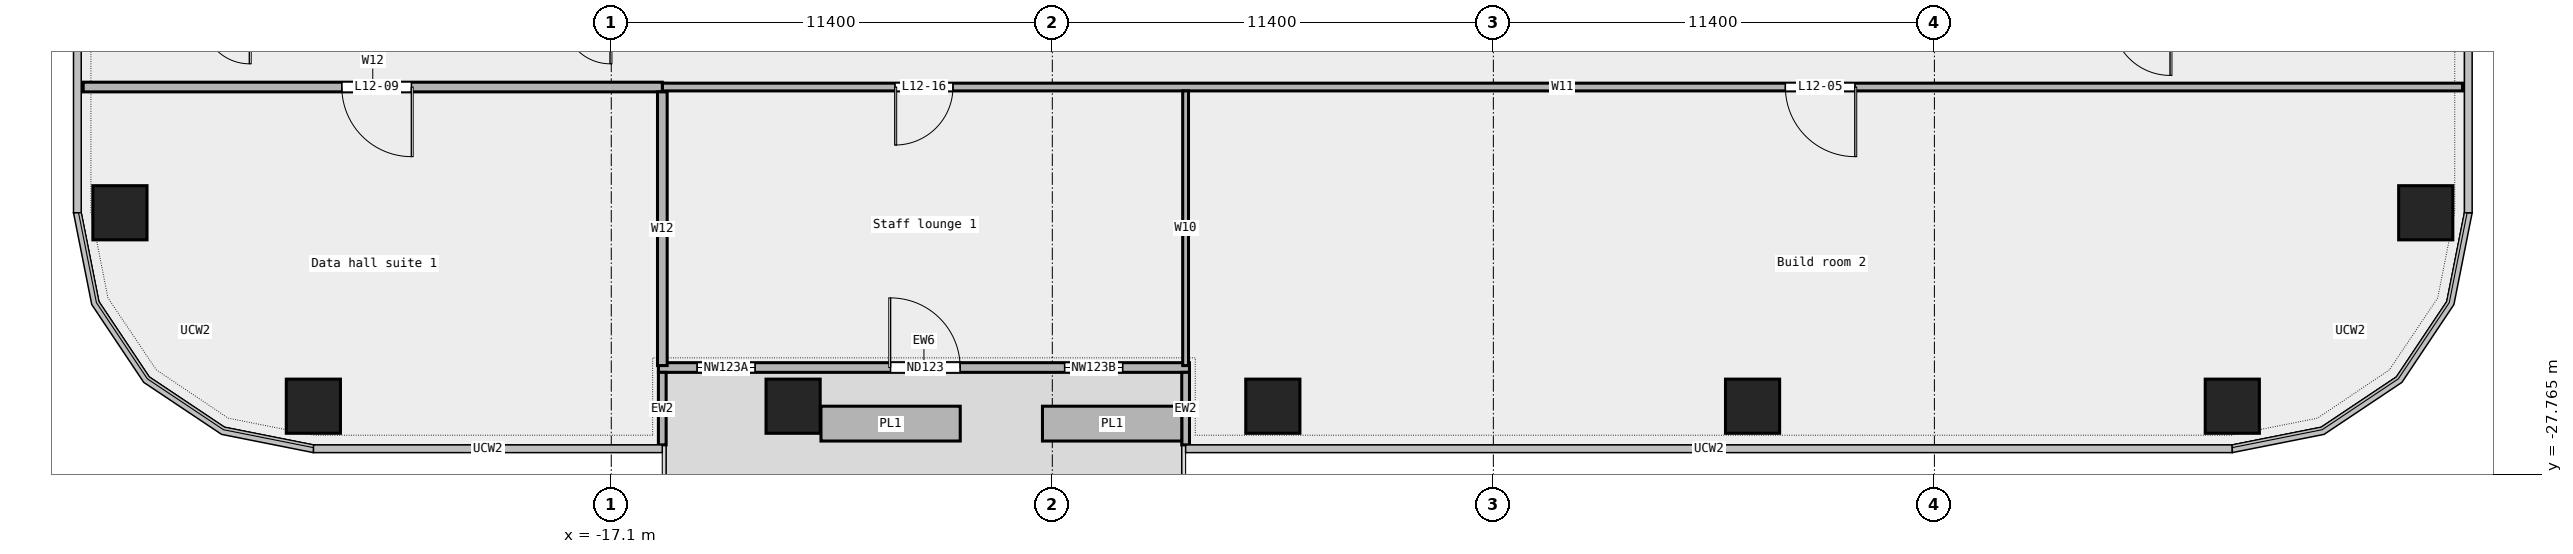
"""IFC4 building model, lengths in metres.
Left out: names, types, materials, properties, quantities, classifications, styles, units other than length and angle.
Written with IfcOpenShell. Run it as: python <this file> out.ifc"""

import sys

from ifc_helpers import new_model, si_unit, direction, frame, frame_2d, origin, origin_2d, place, context, subcontext, project, spatial, rectangle, extrude, element, fill, save


model = new_model("IFC4")
c1 = context("Model", 3, precision=1e-05, world=origin(), true_north=direction((0.0, 1.0)))
c2 = subcontext(c1, "Body", "Model", "MODEL_VIEW")
j1 = project(units=[si_unit("LENGTHUNIT", "METRE"), si_unit("PLANEANGLEUNIT", "RADIAN")], contexts=[c1])
p1 = place(None, origin())
s1 = spatial("IfcSite", under=j1, at=p1, CompositionType="ELEMENT")
p2 = place(p1, origin())
s2 = spatial("IfcBuilding", under=s1, at=p2, CompositionType="ELEMENT")
p3 = place(p2, frame((0.0, 0.0, 64.6)))
s3 = spatial("IfcBuildingStorey", under=s2, at=p3, CompositionType="ELEMENT", Elevation=64.6)
for number, where, z_axis, x_axis in (
    (1, (-24.8, -26.0, 0.0), (0.0, 0.0, 1.0), (1.0, 0.0, 0.0)),
    (2, (-12.4, -26.0, 0.0), (0.0, 0.0, 1.0), (1.0, 0.0, 0.0)),
    (3, (0.0, -26.0, 0.0), (0.0, 0.0, 1.0), (1.0, 0.0, 0.0)),
    (4, (12.4, -26.0, 0.0), (0.0, 0.0, 1.0), (1.0, 0.0, 0.0)),
    (5, (24.8, -26.0, 0.0), (0.0, 0.0, 1.0), (1.0, 0.0, 0.0)),
    (6, (29.8, -21.0, 0.0), (0.0, 0.0, 1.0), (1.0, 0.0, 0.0)),
    (7, (-29.8, -21.0, 0.0), (0.0, 0.0, 1.0), (1.0, 0.0, 0.0)),
):
    element("IfcColumn", number, at=place(p3, frame(where, z_axis=z_axis, x_axis=x_axis)), inside=s3, PredefinedType="COLUMN", context=c2, shape_type="SweptSolid", body=[
        extrude(rectangle(XDim=1.4, YDim=1.4, at=origin_2d()), origin(), (0.0, 0.0, 1.0), 4.35),
    ])
p4 = place(p3, frame((-15.882, -25.0, 0.0), z_axis=(0.0, 0.0, 1.0), x_axis=(1.0, 0.0, 0.0)))
e8 = element("IfcWall", 8, at=p4, inside=s3, PredefinedType="STANDARD", context=c2, shape_type="SweptSolid", body=[
    extrude(rectangle(XDim=13.727, YDim=0.25, at=frame_2d((6.864, 0.0))), origin(), (0.0, 0.0, 1.0), 4.35),
])
p5 = place(p4, frame((1.0, 0.0, 0.45)))
e9 = element("IfcOpeningElement", 9, at=p5, cuts=e8, PredefinedType="OPENING", context=c2, shape_type="SweptSolid", body=[
    extrude(rectangle(XDim=1.5, YDim=3.0, at=frame_2d((0.75, 1.5))), frame((0.0, 0.137, 0.0), z_axis=(0.0, -1.0, 0.0), x_axis=(1.0, 0.0, 0.0)), (0.0, 0.0, 1.0), 0.274),
])
p6 = place(p4, frame((6.0, 0.0, 0.0)))
e10 = element("IfcOpeningElement", 10, at=p6, cuts=e8, PredefinedType="OPENING", context=c2, shape_type="SweptSolid", body=[
    extrude(rectangle(XDim=1.8, YDim=2.4, at=frame_2d((0.9, 1.2))), frame((0.0, 0.137, 0.0), z_axis=(0.0, -1.0, 0.0), x_axis=(1.0, 0.0, 0.0)), (0.0, 0.0, 1.0), 0.274),
])
p7 = place(p4, frame((10.5, 0.0, 0.45)))
e11 = element("IfcOpeningElement", 11, at=p7, cuts=e8, PredefinedType="OPENING", context=c2, shape_type="SweptSolid", body=[
    extrude(rectangle(XDim=1.5, YDim=3.0, at=frame_2d((0.75, 1.5))), frame((0.0, 0.137, 0.0), z_axis=(0.0, -1.0, 0.0), x_axis=(1.0, 0.0, 0.0)), (0.0, 0.0, 1.0), 0.274),
])
for number, where, z_axis, x_axis in (
    (12, (-15.782, -27.0, 0.0), (0.0, 0.0, 1.0), (0.0, 1.0, 0.0)),
    (13, (-2.255, -27.0, 0.0), (0.0, 0.0, 1.0), (0.0, 1.0, 0.0)),
):
    element("IfcWall", number, at=place(p3, frame(where, z_axis=z_axis, x_axis=x_axis)), inside=s3, PredefinedType="STANDARD", context=c2, shape_type="SweptSolid", body=[
        extrude(rectangle(XDim=1.875, YDim=0.2, at=frame_2d((0.938, 0.0))), origin(), (0.0, 0.0, 1.0), 4.35),
    ])
for number, where, z_axis, x_axis in (
    (14, (-11.68, -26.45, 0.0), (0.0, 0.0, 1.0), (1.0, 0.0, 0.0)),
    (15, (-5.955, -26.45, 0.0), (0.0, 0.0, 1.0), (1.0, 0.0, 0.0)),
):
    element("IfcWall", number, at=place(p3, frame(where, z_axis=z_axis, x_axis=x_axis)), inside=s3, PredefinedType="STANDARD", context=c2, shape_type="SweptSolid", body=[
        extrude(rectangle(XDim=3.6, YDim=0.9, at=frame_2d((1.8, 0.0))), origin(), (0.0, 0.0, 1.0), 0.7),
    ])
p8 = place(p3, frame((-15.78, -17.75, 0.0), z_axis=(0.0, 0.0, 1.0), x_axis=(1.0, 0.0, 0.0)))
e16 = element("IfcWall", 16, at=p8, inside=s3, PredefinedType="PARTITIONING", context=c2, shape_type="SweptSolid", body=[
    extrude(rectangle(XDim=46.53, YDim=0.2, at=frame_2d((23.265, 0.0))), origin(), (0.0, 0.0, 1.0), 4.35),
])
p9 = place(p8, frame((29.028, 0.0, 0.0)))
e17 = element("IfcOpeningElement", 17, at=p9, cuts=e16, PredefinedType="OPENING", context=c2, shape_type="SweptSolid", body=[
    extrude(rectangle(XDim=1.8, YDim=2.1, at=frame_2d((0.9, 1.05))), frame((0.0, 0.112, 0.0), z_axis=(0.0, -1.0, 0.0), x_axis=(1.0, 0.0, 0.0)), (0.0, 0.0, 1.0), 0.224),
])
p10 = place(p8, frame((6.012, 0.0, 0.0)))
e18 = element("IfcOpeningElement", 18, at=p10, cuts=e16, PredefinedType="OPENING", context=c2, shape_type="SweptSolid", body=[
    extrude(rectangle(XDim=1.5, YDim=2.1, at=frame_2d((0.75, 1.05))), frame((0.0, 0.112, 0.0), z_axis=(0.0, -1.0, 0.0), x_axis=(1.0, 0.0, 0.0)), (0.0, 0.0, 1.0), 0.224),
])
p11 = place(p3, frame((-30.75, -17.75, 0.0), z_axis=(0.0, 0.0, 1.0), x_axis=(1.0, 0.0, 0.0)))
e19 = element("IfcWall", 19, at=p11, inside=s3, PredefinedType="PARTITIONING", context=c2, shape_type="SweptSolid", body=[
    extrude(rectangle(XDim=14.97, YDim=0.25, at=frame_2d((7.485, 0.0))), origin(), (0.0, 0.0, 1.0), 4.35),
])
p12 = place(p11, frame((6.685, 0.0, 0.0)))
e20 = element("IfcOpeningElement", 20, at=p12, cuts=e19, PredefinedType="OPENING", context=c2, shape_type="SweptSolid", body=[
    extrude(rectangle(XDim=1.8, YDim=2.1, at=frame_2d((0.9, 1.05))), frame((0.0, 0.137, 0.0), z_axis=(0.0, -1.0, 0.0), x_axis=(1.0, 0.0, 0.0)), (0.0, 0.0, 1.0), 0.274),
])
p13 = place(p3, frame((-15.78, -24.95, 0.0), z_axis=(0.0, 0.0, 1.0), x_axis=(0.0, 1.0, 0.0)))
e21 = element("IfcWall", 21, at=p13, inside=s3, PredefinedType="PARTITIONING", context=c2, shape_type="SweptSolid", body=[
    extrude(rectangle(XDim=7.075, YDim=0.25, at=frame_2d((3.538, 0.0))), origin(), (0.0, 0.0, 1.0), 4.35),
])
p14 = place(p3, frame((-2.255, -24.95, 0.0), z_axis=(0.0, 0.0, 1.0), x_axis=(0.0, 1.0, 0.0)))
e22 = element("IfcWall", 22, at=p14, inside=s3, PredefinedType="PARTITIONING", context=c2, shape_type="SweptSolid", body=[
    extrude(rectangle(XDim=7.1, YDim=0.15, at=frame_2d((3.55, 0.0))), origin(), (0.0, 0.0, 1.0), 4.35),
])
p15 = place(p5, origin())
e23 = element("IfcWindow", 23, at=p15, inside=s3, PartitioningType="SINGLE_PANEL", PredefinedType="WINDOW", context=c2, shape_type="SweptSolid", body=[
    extrude(rectangle(XDim=1.5, YDim=3.0, at=frame_2d((0.75, 1.5))), frame((0.0, 0.03, 0.0), z_axis=(0.0, -1.0, 0.0), x_axis=(1.0, 0.0, 0.0)), (0.0, 0.0, 1.0), 0.06),
])
fill(e9, e23)
p16 = place(p6, origin())
e24 = element("IfcDoor", 24, at=p16, inside=s3, OperationType="DOUBLE_DOOR_SINGLE_SWING", PredefinedType="DOOR", context=c2, shape_type="SweptSolid", body=[
    extrude(rectangle(XDim=1.8, YDim=2.4, at=frame_2d((0.9, 1.2))), frame((0.0, 0.025, 0.0), z_axis=(0.0, -1.0, 0.0), x_axis=(1.0, 0.0, 0.0)), (0.0, 0.0, 1.0), 0.05),
])
fill(e10, e24)
p17 = place(p7, origin())
e25 = element("IfcWindow", 25, at=p17, inside=s3, PartitioningType="SINGLE_PANEL", PredefinedType="WINDOW", context=c2, shape_type="SweptSolid", body=[
    extrude(rectangle(XDim=1.5, YDim=3.0, at=frame_2d((0.75, 1.5))), frame((0.0, 0.03, 0.0), z_axis=(0.0, -1.0, 0.0), x_axis=(1.0, 0.0, 0.0)), (0.0, 0.0, 1.0), 0.06),
])
fill(e11, e25)
p18 = place(p9, origin())
e26 = element("IfcDoor", 26, at=p18, inside=s3, OperationType="DOUBLE_DOOR_SINGLE_SWING", PredefinedType="DOOR", context=c2, shape_type="SweptSolid", body=[
    extrude(rectangle(XDim=1.8, YDim=2.1, at=frame_2d((0.9, 1.05))), frame((0.0, 0.025, 0.0), z_axis=(0.0, -1.0, 0.0), x_axis=(1.0, 0.0, 0.0)), (0.0, 0.0, 1.0), 0.05),
])
fill(e17, e26)
p19 = place(p12, origin())
e27 = element("IfcDoor", 27, at=p19, inside=s3, OperationType="DOUBLE_DOOR_SINGLE_SWING", PredefinedType="DOOR", context=c2, shape_type="SweptSolid", body=[
    extrude(rectangle(XDim=1.8, YDim=2.1, at=frame_2d((0.9, 1.05))), frame((0.0, 0.025, 0.0), z_axis=(0.0, -1.0, 0.0), x_axis=(1.0, 0.0, 0.0)), (0.0, 0.0, 1.0), 0.05),
])
fill(e20, e27)
p20 = place(p10, origin())
e28 = element("IfcDoor", 28, at=p20, inside=s3, OperationType="DOUBLE_DOOR_SINGLE_SWING", PredefinedType="DOOR", context=c2, shape_type="SweptSolid", body=[
    extrude(rectangle(XDim=1.5, YDim=2.1, at=frame_2d((0.75, 1.05))), frame((0.0, 0.025, 0.0), z_axis=(0.0, -1.0, 0.0), x_axis=(1.0, 0.0, 0.0)), (0.0, 0.0, 1.0), 0.05),
])
fill(e18, e28)
save(model, sys.argv[1])
